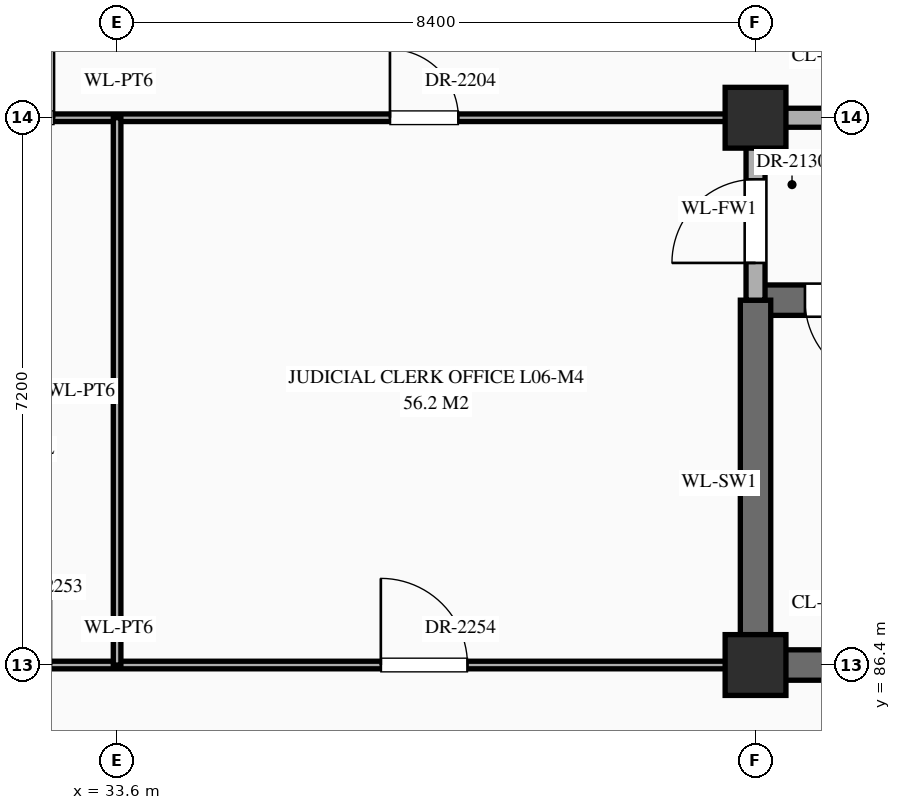
"""IFC4 building model, lengths in metres.
Left out: names, types, materials, properties, quantities, classifications, styles, units other than length and angle.
Written with IfcOpenShell. Run it as: python <this file> out.ifc"""

import sys

from ifc_helpers import new_model, si_unit, direction, frame, frame_2d, origin, origin_2d, place, context, subcontext, project, spatial, rectangle, extrude, element, fill, save


model = new_model("IFC4")
c1 = context("Model", 3, precision=1e-05, world=origin(), true_north=direction((0.0, 1.0)))
c2 = subcontext(c1, "Body", "Model", "MODEL_VIEW")
j1 = project(units=[si_unit("LENGTHUNIT", "METRE"), si_unit("PLANEANGLEUNIT", "RADIAN")], contexts=[c1])
p1 = place(None, origin())
s1 = spatial("IfcSite", under=j1, at=p1, CompositionType="ELEMENT")
p2 = place(p1, origin())
s2 = spatial("IfcBuilding", under=s1, at=p2, CompositionType="ELEMENT")
p3 = place(p2, frame((0.0, 0.0, 26.1)))
s3 = spatial("IfcBuildingStorey", under=s2, at=p3, CompositionType="ELEMENT", Elevation=26.1)
for number, where, z_axis, x_axis in (
    (1, (42.0, 86.4, 0.0), (0.0, 0.0, 1.0), (1.0, 0.0, 0.0)),
    (2, (42.0, 93.6, 0.0), (0.0, 0.0, 1.0), (1.0, 0.0, 0.0)),
):
    element("IfcColumn", number, at=place(p3, frame(where, z_axis=z_axis, x_axis=x_axis)), inside=s3, PredefinedType="COLUMN", context=c2, shape_type="SweptSolid", body=[
        extrude(rectangle(XDim=0.8, YDim=0.8, at=origin_2d()), origin(), (0.0, 0.0, 1.0), 4.5),
    ])
p4 = place(p3, frame((25.24, 86.4, 0.0), z_axis=(0.0, 0.0, 1.0), x_axis=(1.0, 0.0, 0.0)))
e3 = element("IfcWall", 3, at=p4, inside=s3, PredefinedType="STANDARD", context=c2, shape_type="SweptSolid", body=[
    extrude(rectangle(XDim=16.76, YDim=0.1, at=frame_2d((8.38, 0.0))), origin(), (0.0, 0.0, 1.0), 3.19),
])
p5 = place(p4, frame((1.05, 0.0, 0.0)))
e4 = element("IfcOpeningElement", 4, at=p5, cuts=e3, PredefinedType="OPENING", context=c2, shape_type="SweptSolid", body=[
    extrude(rectangle(XDim=0.94, YDim=2.3, at=frame_2d((0.47, 1.15))), frame((0.0, 0.062, 0.0), z_axis=(0.0, -1.0, 0.0), x_axis=(1.0, 0.0, 0.0)), (0.0, 0.0, 1.0), 0.124),
])
p6 = place(p4, frame((3.385, 0.0, 0.0)))
e5 = element("IfcOpeningElement", 5, at=p6, cuts=e3, PredefinedType="OPENING", context=c2, shape_type="SweptSolid", body=[
    extrude(rectangle(XDim=1.55, YDim=2.35, at=frame_2d((0.775, 1.175))), frame((0.0, 0.062, 0.0), z_axis=(0.0, -1.0, 0.0), x_axis=(1.0, 0.0, 0.0)), (0.0, 0.0, 1.0), 0.124),
])
p7 = place(p4, frame((6.43, 0.0, 0.0)))
e6 = element("IfcOpeningElement", 6, at=p7, cuts=e3, PredefinedType="OPENING", context=c2, shape_type="SweptSolid", body=[
    extrude(rectangle(XDim=1.06, YDim=2.4, at=frame_2d((0.53, 1.2))), frame((0.0, 0.062, 0.0), z_axis=(0.0, -1.0, 0.0), x_axis=(1.0, 0.0, 0.0)), (0.0, 0.0, 1.0), 0.124),
])
p8 = place(p4, frame((11.83, 0.0, 0.0)))
e7 = element("IfcOpeningElement", 7, at=p8, cuts=e3, PredefinedType="OPENING", context=c2, shape_type="SweptSolid", body=[
    extrude(rectangle(XDim=1.14, YDim=2.4, at=frame_2d((0.57, 1.2))), frame((0.0, 0.062, 0.0), z_axis=(0.0, -1.0, 0.0), x_axis=(1.0, 0.0, 0.0)), (0.0, 0.0, 1.0), 0.124),
])
p9 = place(p3, frame((42.0, 86.4, 0.0), z_axis=(0.0, 0.0, 1.0), x_axis=(1.0, 0.0, 0.0)))
e8 = element("IfcWall", 8, at=p9, inside=s3, PredefinedType="SHEAR", context=c2, shape_type="SweptSolid", body=[
    extrude(rectangle(XDim=8.4, YDim=0.4, at=frame_2d((4.2, 0.0))), origin(), (0.0, 0.0, 1.0), 4.24),
])
p10 = place(p3, frame((42.0, 91.2, 0.0), z_axis=(0.0, 0.0, 1.0), x_axis=(1.0, 0.0, 0.0)))
e9 = element("IfcWall", 9, at=p10, inside=s3, PredefinedType="SHEAR", context=c2, shape_type="SweptSolid", body=[
    extrude(rectangle(XDim=8.4, YDim=0.4, at=frame_2d((4.2, 0.0))), origin(), (0.0, 0.0, 1.0), 4.24),
])
p11 = place(p10, frame((0.65, 0.0, 0.0)))
e10 = element("IfcOpeningElement", 10, at=p11, cuts=e9, PredefinedType="OPENING", context=c2, shape_type="SweptSolid", body=[
    extrude(rectangle(XDim=1.1, YDim=2.2, at=frame_2d((0.55, 1.1))), frame((0.0, 0.212, 0.0), z_axis=(0.0, -1.0, 0.0), x_axis=(1.0, 0.0, 0.0)), (0.0, 0.0, 1.0), 0.424),
])
p12 = place(p3, frame((25.24, 93.6, 0.0), z_axis=(0.0, 0.0, 1.0), x_axis=(1.0, 0.0, 0.0)))
e11 = element("IfcWall", 11, at=p12, inside=s3, PredefinedType="STANDARD", context=c2, shape_type="SweptSolid", body=[
    extrude(rectangle(XDim=16.76, YDim=0.1, at=frame_2d((8.38, 0.0))), origin(), (0.0, 0.0, 1.0), 3.19),
])
p13 = place(p12, frame((1.01, 0.0, 0.0)))
e12 = element("IfcOpeningElement", 12, at=p13, cuts=e11, PredefinedType="OPENING", context=c2, shape_type="SweptSolid", body=[
    extrude(rectangle(XDim=1.02, YDim=2.4, at=frame_2d((0.51, 1.2))), frame((0.0, 0.062, 0.0), z_axis=(0.0, -1.0, 0.0), x_axis=(1.0, 0.0, 0.0)), (0.0, 0.0, 1.0), 0.124),
])
p14 = place(p12, frame((3.26, 0.0, 0.0)))
e13 = element("IfcOpeningElement", 13, at=p14, cuts=e11, PredefinedType="OPENING", context=c2, shape_type="SweptSolid", body=[
    extrude(rectangle(XDim=1.8, YDim=2.5, at=frame_2d((0.9, 1.25))), frame((0.0, 0.062, 0.0), z_axis=(0.0, -1.0, 0.0), x_axis=(1.0, 0.0, 0.0)), (0.0, 0.0, 1.0), 0.124),
])
p15 = place(p12, frame((6.39, 0.0, 0.0)))
e14 = element("IfcOpeningElement", 14, at=p15, cuts=e11, PredefinedType="OPENING", context=c2, shape_type="SweptSolid", body=[
    extrude(rectangle(XDim=1.14, YDim=2.4, at=frame_2d((0.57, 1.2))), frame((0.0, 0.062, 0.0), z_axis=(0.0, -1.0, 0.0), x_axis=(1.0, 0.0, 0.0)), (0.0, 0.0, 1.0), 0.124),
])
p16 = place(p12, frame((11.95, 0.0, 0.0)))
e15 = element("IfcOpeningElement", 15, at=p16, cuts=e11, PredefinedType="OPENING", context=c2, shape_type="SweptSolid", body=[
    extrude(rectangle(XDim=0.9, YDim=2.15, at=frame_2d((0.45, 1.075))), frame((0.0, 0.062, 0.0), z_axis=(0.0, -1.0, 0.0), x_axis=(1.0, 0.0, 0.0)), (0.0, 0.0, 1.0), 0.124),
])
p17 = place(p3, frame((42.0, 93.6, 0.0), z_axis=(0.0, 0.0, 1.0), x_axis=(1.0, 0.0, 0.0)))
e16 = element("IfcWall", 16, at=p17, inside=s3, PredefinedType="STANDARD", context=c2, shape_type="SweptSolid", body=[
    extrude(rectangle(XDim=8.4, YDim=0.25, at=frame_2d((4.2, 0.0))), origin(), (0.0, 0.0, 1.0), 3.39),
])
p18 = place(p17, frame((3.2, 0.0, 0.0)))
e17 = element("IfcOpeningElement", 17, at=p18, cuts=e16, PredefinedType="OPENING", context=c2, shape_type="SweptSolid", body=[
    extrude(rectangle(XDim=2.0, YDim=2.4, at=frame_2d((1.0, 1.2))), frame((0.0, 0.137, 0.0), z_axis=(0.0, -1.0, 0.0), x_axis=(1.0, 0.0, 0.0)), (0.0, 0.0, 1.0), 0.274),
])
p19 = place(p3, frame((33.6, 86.4, 0.0), z_axis=(0.0, 0.0, 1.0), x_axis=(0.0, 1.0, 0.0)))
e18 = element("IfcWall", 18, at=p19, inside=s3, PredefinedType="STANDARD", context=c2, shape_type="SweptSolid", body=[
    extrude(rectangle(XDim=7.2, YDim=0.1, at=frame_2d((3.6, 0.0))), origin(), (0.0, 0.0, 1.0), 4.24),
])
p20 = place(p3, frame((42.0, 86.4, 0.0), z_axis=(0.0, 0.0, 1.0), x_axis=(0.0, 1.0, 0.0)))
e19 = element("IfcWall", 19, at=p20, inside=s3, PredefinedType="SHEAR", context=c2, shape_type="SweptSolid", body=[
    extrude(rectangle(XDim=4.8, YDim=0.4, at=frame_2d((2.4, 0.0))), origin(), (0.0, 0.0, 1.0), 4.24),
])
p21 = place(p3, frame((42.0, 91.2, 0.0), z_axis=(0.0, 0.0, 1.0), x_axis=(0.0, 1.0, 0.0)))
e20 = element("IfcWall", 20, at=p21, inside=s3, PredefinedType="STANDARD", context=c2, shape_type="SweptSolid", body=[
    extrude(rectangle(XDim=2.4, YDim=0.25, at=frame_2d((1.2, 0.0))), origin(), (0.0, 0.0, 1.0), 3.49),
])
p22 = place(p21, frame((0.49, 0.0, 0.0)))
e21 = element("IfcOpeningElement", 21, at=p22, cuts=e20, PredefinedType="OPENING", context=c2, shape_type="SweptSolid", body=[
    extrude(rectangle(XDim=1.1, YDim=2.2, at=frame_2d((0.55, 1.1))), frame((0.0, 0.137, 0.0), z_axis=(0.0, -1.0, 0.0), x_axis=(1.0, 0.0, 0.0)), (0.0, 0.0, 1.0), 0.274),
])
p23 = place(p11, frame((1.1, 0.0, 0.0), z_axis=(0.0, 0.0, 1.0), x_axis=(-1.0, 0.0, 0.0)))
e22 = element("IfcDoor", 22, at=p23, inside=s3, OperationType="SINGLE_SWING_LEFT", PredefinedType="DOOR", context=c2, shape_type="SweptSolid", body=[
    extrude(rectangle(XDim=1.1, YDim=2.2, at=frame_2d((0.55, 1.1))), frame((0.0, 0.025, 0.0), z_axis=(0.0, -1.0, 0.0), x_axis=(1.0, 0.0, 0.0)), (0.0, 0.0, 1.0), 0.05),
])
fill(e10, e22)
p24 = place(p22, origin())
e23 = element("IfcDoor", 23, at=p24, inside=s3, OperationType="SINGLE_SWING_LEFT", PredefinedType="DOOR", context=c2, shape_type="SweptSolid", body=[
    extrude(rectangle(XDim=1.1, YDim=2.2, at=frame_2d((0.55, 1.1))), frame((0.0, 0.025, 0.0), z_axis=(0.0, -1.0, 0.0), x_axis=(1.0, 0.0, 0.0)), (0.0, 0.0, 1.0), 0.05),
])
fill(e21, e23)
p25 = place(p15, origin())
e24 = element("IfcDoor", 24, at=p25, inside=s3, OperationType="SINGLE_SWING_RIGHT", PredefinedType="DOOR", context=c2, shape_type="SweptSolid", body=[
    extrude(rectangle(XDim=1.14, YDim=2.4, at=frame_2d((0.57, 1.2))), frame((0.0, 0.025, 0.0), z_axis=(0.0, -1.0, 0.0), x_axis=(1.0, 0.0, 0.0)), (0.0, 0.0, 1.0), 0.05),
])
fill(e14, e24)
p26 = place(p16, origin())
e25 = element("IfcDoor", 25, at=p26, inside=s3, OperationType="SINGLE_SWING_LEFT", PredefinedType="DOOR", context=c2, shape_type="SweptSolid", body=[
    extrude(rectangle(XDim=0.9, YDim=2.15, at=frame_2d((0.45, 1.075))), frame((0.0, 0.025, 0.0), z_axis=(0.0, -1.0, 0.0), x_axis=(1.0, 0.0, 0.0)), (0.0, 0.0, 1.0), 0.05),
])
fill(e15, e25)
p27 = place(p8, origin())
e26 = element("IfcDoor", 26, at=p27, inside=s3, OperationType="SINGLE_SWING_LEFT", PredefinedType="DOOR", context=c2, shape_type="SweptSolid", body=[
    extrude(rectangle(XDim=1.14, YDim=2.4, at=frame_2d((0.57, 1.2))), frame((0.0, 0.025, 0.0), z_axis=(0.0, -1.0, 0.0), x_axis=(1.0, 0.0, 0.0)), (0.0, 0.0, 1.0), 0.05),
])
fill(e7, e26)
save(model, sys.argv[1])
